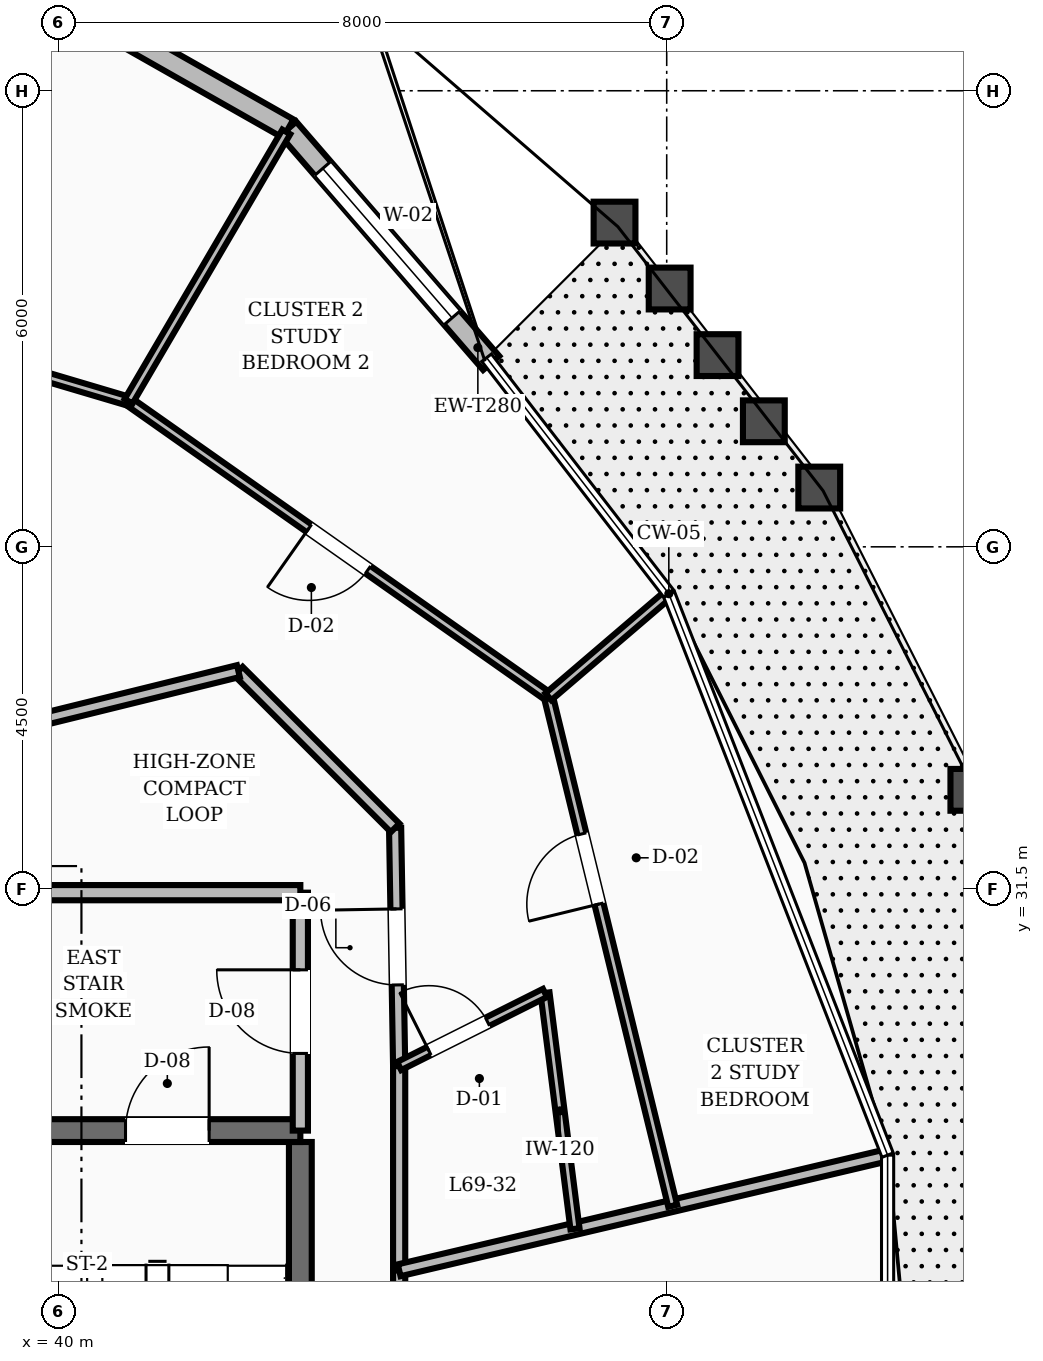
"""IFC4 building model, lengths in metres.
Left out: names, types, materials, properties, quantities, classifications, styles, units other than length and angle.
Written with IfcOpenShell. Run it as: python <this file> out.ifc"""

import sys

from ifc_helpers import new_model, si_unit, direction, frame, frame_2d, origin, place, context, subcontext, project, spatial, rectangle, extrude, element, fill, save


model = new_model("IFC4")
c1 = context("Model", 3, precision=1e-05, world=origin(), true_north=direction((0.0, 1.0)))
c2 = subcontext(c1, "Body", "Model", "MODEL_VIEW")
j1 = project(units=[si_unit("LENGTHUNIT", "METRE"), si_unit("PLANEANGLEUNIT", "RADIAN")], contexts=[c1])
p1 = place(None, origin())
s1 = spatial("IfcSite", under=j1, at=p1, CompositionType="ELEMENT")
p2 = place(p1, origin())
s2 = spatial("IfcBuilding", under=s1, at=p2, CompositionType="ELEMENT")
p3 = place(p2, frame((0.0, 0.0, 265.2)))
s3 = spatial("IfcBuildingStorey", under=s2, at=p3, CompositionType="ELEMENT", Elevation=265.2)
p4 = place(p3, frame((43.18, 19.43, 0.0), z_axis=(0.0, 0.0, 1.0), x_axis=(0.0, 1.0, 0.0)))
e1 = element("IfcWall", 1, at=p4, inside=s3, PredefinedType="SHEAR", context=c2, shape_type="SweptSolid", body=[
    extrude(rectangle(XDim=8.74, YDim=0.3, at=frame_2d((4.37, 0.0))), origin(), (0.0, 0.0, 1.0), 3.6),
])
p5 = place(p3, frame((39.58, 28.32, 0.0), z_axis=(0.0, 0.0, 1.0), x_axis=(1.0, 0.0, 0.0)))
e2 = element("IfcWall", 2, at=p5, inside=s3, PredefinedType="SHEAR", context=c2, shape_type="SweptSolid", body=[
    extrude(rectangle(XDim=3.6, YDim=0.3, at=frame_2d((1.8, 0.0))), origin(), (0.0, 0.0, 1.0), 3.6),
])
p6 = place(p5, frame((1.3, 0.0, 0.0)))
e3 = element("IfcOpeningElement", 3, at=p6, cuts=e2, PredefinedType="OPENING", context=c2, shape_type="SweptSolid", body=[
    extrude(rectangle(XDim=1.1, YDim=2.1, at=frame_2d((0.55, 1.05))), frame((0.0, 0.16, 0.0), z_axis=(0.0, -1.0, 0.0), x_axis=(1.0, 0.0, 0.0)), (0.0, 0.0, 1.0), 0.32),
])
p7 = place(p3, frame((45.691, 38.418, 0.0), z_axis=(0.0, 0.0, 1.0), x_axis=(-0.65465247958, 0.755929977564, 0.0)))
e4 = element("IfcWall", 4, at=p7, inside=s3, PredefinedType="STANDARD", context=c2, shape_type="SweptSolid", body=[
    extrude(rectangle(XDim=4.079, YDim=0.28, at=frame_2d((2.04, 0.0))), origin(), (0.0, 0.0, 1.0), 2.88),
])
p8 = place(p7, frame((0.785, 0.0, 0.8)))
e5 = element("IfcOpeningElement", 5, at=p8, cuts=e4, PredefinedType="OPENING", context=c2, shape_type="SweptSolid", body=[
    extrude(rectangle(XDim=2.6, YDim=1.65, at=frame_2d((1.3, 0.825))), frame((0.0, 0.15, 0.0), z_axis=(0.0, -1.0, 0.0), x_axis=(1.0, 0.0, 0.0)), (0.0, 0.0, 1.0), 0.3),
])
p9 = place(p3, frame((43.021, 41.502, 0.0), z_axis=(0.0, 0.0, 1.0), x_axis=(-0.869835312163, 0.49334220346, 0.0)))
e6 = element("IfcWall", 6, at=p9, inside=s3, PredefinedType="STANDARD", context=c2, shape_type="SweptSolid", body=[
    extrude(rectangle(XDim=3.943, YDim=0.28, at=frame_2d((1.971, 0.0))), origin(), (0.0, 0.0, 1.0), 2.88),
])
p10 = place(p3, frame((43.18, 28.32, 0.0), z_axis=(0.0, 0.0, 1.0), x_axis=(0.0, 1.0, 0.0)))
e7 = element("IfcWall", 7, at=p10, inside=s3, PredefinedType="SOLIDWALL", context=c2, shape_type="SweptSolid", body=[
    extrude(rectangle(XDim=3.13, YDim=0.2, at=frame_2d((1.565, 0.0))), origin(), (0.0, 0.0, 1.0), 2.87),
])
p11 = place(p10, frame((1.015, 0.0, 0.0)))
e8 = element("IfcOpeningElement", 8, at=p11, cuts=e7, PredefinedType="OPENING", context=c2, shape_type="SweptSolid", body=[
    extrude(rectangle(XDim=1.1, YDim=2.1, at=frame_2d((0.55, 1.05))), frame((0.0, 0.11, 0.0), z_axis=(0.0, -1.0, 0.0), x_axis=(1.0, 0.0, 0.0)), (0.0, 0.0, 1.0), 0.22),
])
p12 = place(p3, frame((39.2, 31.45, 0.0), z_axis=(0.0, 0.0, 1.0), x_axis=(1.0, 0.0, 0.0)))
e9 = element("IfcWall", 9, at=p12, inside=s3, PredefinedType="SOLIDWALL", context=c2, shape_type="SweptSolid", body=[
    extrude(rectangle(XDim=3.98, YDim=0.2, at=frame_2d((1.99, 0.0))), origin(), (0.0, 0.0, 1.0), 2.87),
])
p13 = place(p3, frame((44.48, 24.0, 0.0), z_axis=(0.0, 0.0, 1.0), x_axis=(0.0, 1.0, 0.0)))
e10 = element("IfcWall", 10, at=p13, inside=s3, PredefinedType="SOLIDWALL", context=c2, shape_type="SweptSolid", body=[
    extrude(rectangle(XDim=2.482, YDim=0.16, at=frame_2d((1.241, 0.0))), origin(), (0.0, 0.0, 1.0), 2.87),
])
p14 = place(p3, frame((44.48, 26.482, 0.0), z_axis=(0.0, 0.0, 1.0), x_axis=(0.0, 1.0, 0.0)))
e11 = element("IfcWall", 11, at=p14, inside=s3, PredefinedType="SOLIDWALL", context=c2, shape_type="SweptSolid", body=[
    extrude(rectangle(XDim=2.687, YDim=0.16, at=frame_2d((1.344, 0.0))), origin(), (0.0, 0.0, 1.0), 2.87),
])
p15 = place(p3, frame((44.48, 29.169, 0.0), z_axis=(0.0, 0.0, 1.0), x_axis=(-0.016981035134, 0.999855811828, 0.0)))
e12 = element("IfcWall", 12, at=p15, inside=s3, PredefinedType="SOLIDWALL", context=c2, shape_type="SweptSolid", body=[
    extrude(rectangle(XDim=3.134, YDim=0.16, at=frame_2d((1.567, 0.0))), origin(), (0.0, 0.0, 1.0), 2.87),
])
p16 = place(p15, frame((1.067, 0.0, 0.0)))
e13 = element("IfcOpeningElement", 13, at=p16, cuts=e12, PredefinedType="OPENING", context=c2, shape_type="SweptSolid", body=[
    extrude(rectangle(XDim=1.0, YDim=2.1, at=frame_2d((0.5, 1.05))), frame((0.0, 0.09, 0.0), z_axis=(0.0, -1.0, 0.0), x_axis=(1.0, 0.0, 0.0)), (0.0, 0.0, 1.0), 0.18),
])
p17 = place(p3, frame((44.427, 32.303, 0.0), z_axis=(0.0, 0.0, 1.0), x_axis=(-0.707106781187, 0.707106781187, 0.0)))
e14 = element("IfcWall", 14, at=p17, inside=s3, PredefinedType="SOLIDWALL", context=c2, shape_type="SweptSolid", body=[
    extrude(rectangle(XDim=2.916, YDim=0.16, at=frame_2d((1.458, 0.0))), origin(), (0.0, 0.0, 1.0), 2.87),
])
p18 = place(p3, frame((42.365, 34.365, 0.0), z_axis=(0.0, 0.0, 1.0), x_axis=(-0.970939799552, -0.239323850978, 0.0)))
e15 = element("IfcWall", 15, at=p18, inside=s3, PredefinedType="SOLIDWALL", context=c2, shape_type="SweptSolid", body=[
    extrude(rectangle(XDim=4.241, YDim=0.16, at=frame_2d((2.12, 0.0))), origin(), (0.0, 0.0, 1.0), 2.87),
])
p19 = place(p3, frame((44.48, 26.482, 0.0), z_axis=(0.0, 0.0, 1.0), x_axis=(0.973328646979, 0.229415223928, 0.0)))
e16 = element("IfcWall", 16, at=p19, inside=s3, PredefinedType="SOLIDWALL", context=c2, shape_type="SweptSolid", body=[
    extrude(rectangle(XDim=6.552, YDim=0.16, at=frame_2d((3.276, 0.0))), origin(), (0.0, 0.0, 1.0), 2.87),
])
p20 = place(p3, frame((46.793, 27.028, 0.0), z_axis=(0.0, 0.0, 1.0), x_axis=(-0.126262657016, 0.99199684548, 0.0)))
e17 = element("IfcWall", 17, at=p20, inside=s3, PredefinedType="PARTITIONING", context=c2, shape_type="SweptSolid", body=[
    extrude(rectangle(XDim=3.129, YDim=0.12, at=frame_2d((1.564, 0.0))), origin(), (0.0, 0.0, 1.0), 2.87),
])
p21 = place(p3, frame((44.48, 29.169, 0.0), z_axis=(0.0, 0.0, 1.0), x_axis=(0.893971664745, 0.448123490383, 0.0)))
e18 = element("IfcWall", 18, at=p21, inside=s3, PredefinedType="PARTITIONING", context=c2, shape_type="SweptSolid", body=[
    extrude(rectangle(XDim=2.146, YDim=0.12, at=frame_2d((1.073, 0.0))), origin(), (0.0, 0.0, 1.0), 2.87),
])
p22 = place(p21, frame((0.44, 0.0, 0.0)))
e19 = element("IfcOpeningElement", 19, at=p22, cuts=e18, PredefinedType="OPENING", context=c2, shape_type="SweptSolid", body=[
    extrude(rectangle(XDim=0.86, YDim=2.1, at=frame_2d((0.43, 1.05))), frame((0.0, 0.07, 0.0), z_axis=(0.0, -1.0, 0.0), x_axis=(1.0, 0.0, 0.0)), (0.0, 0.0, 1.0), 0.14),
])
p23 = place(p3, frame((48.079, 27.331, 0.0), z_axis=(0.0, 0.0, 1.0), x_axis=(-0.237199115633, 0.971461054054, 0.0)))
e20 = element("IfcWall", 20, at=p23, inside=s3, PredefinedType="PARTITIONING", context=c2, shape_type="SweptSolid", body=[
    extrude(rectangle(XDim=6.894, YDim=0.12, at=frame_2d((3.447, 0.0))), origin(), (0.0, 0.0, 1.0), 2.87),
])
p24 = place(p23, frame((4.086, 0.0, 0.0)))
e21 = element("IfcOpeningElement", 21, at=p24, cuts=e20, PredefinedType="OPENING", context=c2, shape_type="SweptSolid", body=[
    extrude(rectangle(XDim=0.95, YDim=2.1, at=frame_2d((0.475, 1.05))), frame((0.0, 0.07, 0.0), z_axis=(0.0, -1.0, 0.0), x_axis=(1.0, 0.0, 0.0)), (0.0, 0.0, 1.0), 0.14),
])
p25 = place(p3, frame((46.443, 34.028, 0.0), z_axis=(0.0, 0.0, 1.0), x_axis=(-0.817775541749, 0.5755372823, 0.0)))
e22 = element("IfcWall", 22, at=p25, inside=s3, PredefinedType="PARTITIONING", context=c2, shape_type="SweptSolid", body=[
    extrude(rectangle(XDim=6.754, YDim=0.12, at=frame_2d((3.377, 0.0))), origin(), (0.0, 0.0, 1.0), 2.87),
])
p26 = place(p25, frame((2.902, 0.0, 0.0)))
e23 = element("IfcOpeningElement", 23, at=p26, cuts=e22, PredefinedType="OPENING", context=c2, shape_type="SweptSolid", body=[
    extrude(rectangle(XDim=0.95, YDim=2.1, at=frame_2d((0.475, 1.05))), frame((0.0, 0.07, 0.0), z_axis=(0.0, -1.0, 0.0), x_axis=(1.0, 0.0, 0.0)), (0.0, 0.0, 1.0), 0.14),
])
p27 = place(p3, frame((46.443, 34.028, 0.0), z_axis=(0.0, 0.0, 1.0), x_axis=(0.759976039349, 0.649951090172, 0.0)))
e24 = element("IfcWall", 24, at=p27, inside=s3, PredefinedType="PARTITIONING", context=c2, shape_type="SweptSolid", body=[
    extrude(rectangle(XDim=2.035, YDim=0.12, at=frame_2d((1.017, 0.0))), origin(), (0.0, 0.0, 1.0), 2.87),
])
p28 = place(p3, frame((40.92, 37.915, 0.0), z_axis=(0.0, 0.0, 1.0), x_axis=(-0.958730048682, 0.284317944833, 0.0)))
e25 = element("IfcWall", 25, at=p28, inside=s3, PredefinedType="PARTITIONING", context=c2, shape_type="SweptSolid", body=[
    extrude(rectangle(XDim=6.19, YDim=0.12, at=frame_2d((3.095, 0.0))), origin(), (0.0, 0.0, 1.0), 2.87),
])
p29 = place(p28, frame((2.62, 0.0, 0.0)))
e26 = element("IfcOpeningElement", 26, at=p29, cuts=e25, PredefinedType="OPENING", context=c2, shape_type="SweptSolid", body=[
    extrude(rectangle(XDim=0.95, YDim=2.1, at=frame_2d((0.475, 1.05))), frame((0.0, 0.07, 0.0), z_axis=(0.0, -1.0, 0.0), x_axis=(1.0, 0.0, 0.0)), (0.0, 0.0, 1.0), 0.14),
])
p30 = place(p3, frame((40.92, 37.915, 0.0), z_axis=(0.0, 0.0, 1.0), x_axis=(0.505267765721, 0.862962620814, 0.0)))
e27 = element("IfcWall", 27, at=p30, inside=s3, PredefinedType="PARTITIONING", context=c2, shape_type="SweptSolid", body=[
    extrude(rectangle(XDim=4.106, YDim=0.12, at=frame_2d((2.053, 0.0))), origin(), (0.0, 0.0, 1.0), 2.87),
])
p31 = place(p8, origin())
e28 = element("IfcWindow", 28, at=p31, inside=s3, PartitioningType="SINGLE_PANEL", PredefinedType="WINDOW", context=c2, shape_type="SweptSolid", body=[
    extrude(rectangle(XDim=2.6, YDim=1.65, at=frame_2d((1.3, 0.825))), frame((0.0, 0.03, 0.0), z_axis=(0.0, -1.0, 0.0), x_axis=(1.0, 0.0, 0.0)), (0.0, 0.0, 1.0), 0.06),
])
fill(e5, e28)
p32 = place(p6, origin())
e29 = element("IfcDoor", 29, at=p32, inside=s3, OperationType="SINGLE_SWING_RIGHT", PredefinedType="DOOR", context=c2, shape_type="SweptSolid", body=[
    extrude(rectangle(XDim=1.1, YDim=2.1, at=frame_2d((0.55, 1.05))), frame((0.0, 0.025, 0.0), z_axis=(0.0, -1.0, 0.0), x_axis=(1.0, 0.0, 0.0)), (0.0, 0.0, 1.0), 0.05),
])
fill(e3, e29)
p33 = place(p11, origin())
e30 = element("IfcDoor", 30, at=p33, inside=s3, OperationType="SINGLE_SWING_RIGHT", PredefinedType="DOOR", context=c2, shape_type="SweptSolid", body=[
    extrude(rectangle(XDim=1.1, YDim=2.1, at=frame_2d((0.55, 1.05))), frame((0.0, 0.025, 0.0), z_axis=(0.0, -1.0, 0.0), x_axis=(1.0, 0.0, 0.0)), (0.0, 0.0, 1.0), 0.05),
])
fill(e8, e30)
p34 = place(p22, origin())
e31 = element("IfcDoor", 31, at=p34, inside=s3, OperationType="SINGLE_SWING_LEFT", PredefinedType="DOOR", context=c2, shape_type="SweptSolid", body=[
    extrude(rectangle(XDim=0.86, YDim=2.1, at=frame_2d((0.43, 1.05))), frame((0.0, 0.025, 0.0), z_axis=(0.0, -1.0, 0.0), x_axis=(1.0, 0.0, 0.0)), (0.0, 0.0, 1.0), 0.05),
])
fill(e19, e31)
p35 = place(p16, origin())
e32 = element("IfcDoor", 32, at=p35, inside=s3, OperationType="SINGLE_SWING_RIGHT", PredefinedType="DOOR", context=c2, shape_type="SweptSolid", body=[
    extrude(rectangle(XDim=1.0, YDim=2.1, at=frame_2d((0.5, 1.05))), frame((0.0, 0.025, 0.0), z_axis=(0.0, -1.0, 0.0), x_axis=(1.0, 0.0, 0.0)), (0.0, 0.0, 1.0), 0.05),
])
fill(e13, e32)
p36 = place(p24, origin())
e33 = element("IfcDoor", 33, at=p36, inside=s3, OperationType="SINGLE_SWING_LEFT", PredefinedType="DOOR", context=c2, shape_type="SweptSolid", body=[
    extrude(rectangle(XDim=0.95, YDim=2.1, at=frame_2d((0.475, 1.05))), frame((0.0, 0.025, 0.0), z_axis=(0.0, -1.0, 0.0), x_axis=(1.0, 0.0, 0.0)), (0.0, 0.0, 1.0), 0.05),
])
fill(e21, e33)
p37 = place(p26, origin())
e34 = element("IfcDoor", 34, at=p37, inside=s3, OperationType="SINGLE_SWING_RIGHT", PredefinedType="DOOR", context=c2, shape_type="SweptSolid", body=[
    extrude(rectangle(XDim=0.95, YDim=2.1, at=frame_2d((0.475, 1.05))), frame((0.0, 0.025, 0.0), z_axis=(0.0, -1.0, 0.0), x_axis=(1.0, 0.0, 0.0)), (0.0, 0.0, 1.0), 0.05),
])
fill(e23, e34)
save(model, sys.argv[1])
